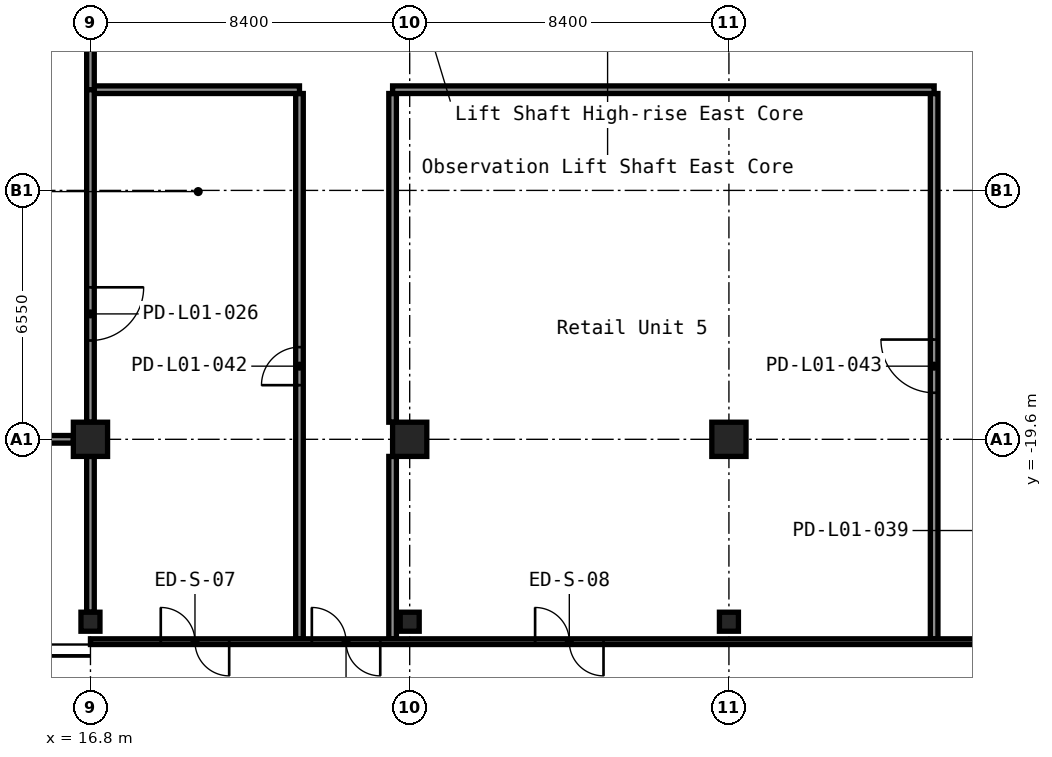
"""IFC4 building model, lengths in metres.
Left out: names, types, materials, properties, quantities, classifications, styles, units other than length and angle.
Written with IfcOpenShell. Run it as: python <this file> out.ifc"""

import sys

from ifc_helpers import new_model, si_unit, direction, frame, frame_2d, origin, origin_2d, place, context, subcontext, project, spatial, rectangle, hollow_rectangle, extrude, element, fill, save


model = new_model("IFC4")
c1 = context("Model", 3, precision=1e-05, world=origin(), true_north=direction((0.0, 1.0)))
c2 = subcontext(c1, "Body", "Model", "MODEL_VIEW")
j1 = project(units=[si_unit("LENGTHUNIT", "METRE"), si_unit("PLANEANGLEUNIT", "RADIAN")], contexts=[c1])
p1 = place(None, origin())
s1 = spatial("IfcSite", under=j1, at=p1, CompositionType="ELEMENT")
p2 = place(p1, origin())
s2 = spatial("IfcBuilding", under=s1, at=p2, CompositionType="ELEMENT")
p3 = place(p2, origin())
s3 = spatial("IfcBuildingStorey", under=s2, at=p3, CompositionType="ELEMENT", Elevation=0.0)
for number, where, z_axis, x_axis in (
    (1, (16.8, -19.6, -0.3), (0.0, 0.0, 1.0), (1.0, 0.0, 0.0)),
    (2, (25.2, -19.6, -0.3), (0.0, 0.0, 1.0), (1.0, 0.0, 0.0)),
    (3, (33.6, -19.6, -0.3), (0.0, 0.0, 1.0), (1.0, 0.0, 0.0)),
):
    element("IfcColumn", number, at=place(p3, frame(where, z_axis=z_axis, x_axis=x_axis)), inside=s3, PredefinedType="COLUMN", context=c2, shape_type="SweptSolid", body=[
        extrude(hollow_rectangle(XDim=0.9, YDim=0.9, WallThickness=0.036, at=origin_2d()), origin(), (0.0, 0.0, 1.0), 8.9),
    ])
for number, where, z_axis, x_axis in (
    (4, (16.8, -24.4, -0.3), (0.0, 0.0, 1.0), (1.0, 0.0, 0.0)),
    (5, (25.2, -24.4, -0.3), (0.0, 0.0, 1.0), (1.0, 0.0, 0.0)),
    (6, (33.6, -24.4, -0.3), (0.0, 0.0, 1.0), (1.0, 0.0, 0.0)),
):
    element("IfcColumn", number, at=place(p3, frame(where, z_axis=z_axis, x_axis=x_axis)), inside=s3, PredefinedType="COLUMN", context=c2, shape_type="SweptSolid", body=[
        extrude(hollow_rectangle(XDim=0.5, YDim=0.5, WallThickness=0.019, InnerFilletRadius=0.029, OuterFilletRadius=0.048, at=origin_2d()), origin(), (0.0, 0.0, 1.0), 8.9),
    ])
p4 = place(p3, frame((22.3, -24.85, 0.0), z_axis=(0.0, 0.0, 1.0), x_axis=(0.0, 1.0, 0.0)))
e7 = element("IfcWall", 7, at=p4, inside=s3, PredefinedType="PARTITIONING", context=c2, shape_type="SweptSolid", body=[
    extrude(rectangle(XDim=14.35, YDim=0.2, at=frame_2d((7.175, 0.0))), origin(), (0.0, 0.0, 1.0), 8.6),
])
p5 = place(p4, frame((6.675, 0.0, 0.0)))
e8 = element("IfcOpeningElement", 8, at=p5, cuts=e7, PredefinedType="OPENING", context=c2, shape_type="SweptSolid", body=[
    extrude(rectangle(XDim=1.0, YDim=2.1, at=frame_2d((0.5, 1.05))), frame((0.0, 0.11, 0.0), z_axis=(0.0, -1.0, 0.0), x_axis=(1.0, 0.0, 0.0)), (0.0, 0.0, 1.0), 0.22),
])
p6 = place(p3, frame((22.3, -10.4, 0.0), z_axis=(0.0, 0.0, 1.0), x_axis=(-1.0, 0.0, 0.0)))
e9 = element("IfcWall", 9, at=p6, inside=s3, PredefinedType="PARTITIONING", context=c2, shape_type="SweptSolid", body=[
    extrude(rectangle(XDim=5.4, YDim=0.2, at=frame_2d((2.7, 0.0))), origin(), (0.0, 0.0, 1.0), 8.6),
])
p7 = place(p3, frame((24.75, -10.5, 0.0), z_axis=(0.0, 0.0, 1.0), x_axis=(0.0, -1.0, 0.0)))
e10 = element("IfcWall", 10, at=p7, inside=s3, PredefinedType="PARTITIONING", context=c2, shape_type="SweptSolid", body=[
    extrude(rectangle(XDim=8.65, YDim=0.2, at=frame_2d((4.325, 0.0))), origin(), (0.0, 0.0, 1.0), 8.6),
])
p8 = place(p3, frame((24.75, -20.05, 0.0), z_axis=(0.0, 0.0, 1.0), x_axis=(0.0, -1.0, 0.0)))
e11 = element("IfcWall", 11, at=p8, inside=s3, PredefinedType="PARTITIONING", context=c2, shape_type="SweptSolid", body=[
    extrude(rectangle(XDim=4.8, YDim=0.2, at=frame_2d((2.4, 0.0))), origin(), (0.0, 0.0, 1.0), 8.6),
])
p9 = place(p3, frame((39.0, -24.85, 0.0), z_axis=(0.0, 0.0, 1.0), x_axis=(0.0, 1.0, 0.0)))
e12 = element("IfcWall", 12, at=p9, inside=s3, PredefinedType="PARTITIONING", context=c2, shape_type="SweptSolid", body=[
    extrude(rectangle(XDim=14.35, YDim=0.2, at=frame_2d((7.175, 0.0))), origin(), (0.0, 0.0, 1.0), 8.6),
])
p10 = place(p9, frame((6.475, 0.0, 0.0)))
e13 = element("IfcOpeningElement", 13, at=p10, cuts=e12, PredefinedType="OPENING", context=c2, shape_type="SweptSolid", body=[
    extrude(rectangle(XDim=1.4, YDim=2.1, at=frame_2d((0.7, 1.05))), frame((0.0, 0.11, 0.0), z_axis=(0.0, -1.0, 0.0), x_axis=(1.0, 0.0, 0.0)), (0.0, 0.0, 1.0), 0.22),
])
p11 = place(p3, frame((39.0, -10.4, 0.0), z_axis=(0.0, 0.0, 1.0), x_axis=(-1.0, 0.0, 0.0)))
e14 = element("IfcWall", 14, at=p11, inside=s3, PredefinedType="PARTITIONING", context=c2, shape_type="SweptSolid", body=[
    extrude(rectangle(XDim=14.25, YDim=0.2, at=frame_2d((7.125, 0.0))), origin(), (0.0, 0.0, 1.0), 8.6),
])
p12 = place(p3, frame((16.8, -10.4, 0.0), z_axis=(0.0, 0.0, 1.0), x_axis=(0.0, 1.0, 0.0)))
e15 = element("IfcWall", 15, at=p12, inside=s3, PredefinedType="PARTITIONING", context=c2, shape_type="SweptSolid", body=[
    extrude(rectangle(XDim=2.0, YDim=0.2, at=frame_2d((1.0, 0.0))), origin(), (0.0, 0.0, 1.0), 8.6),
])
p13 = place(p3, frame((16.8, -10.4, 0.0), z_axis=(0.0, 0.0, 1.0), x_axis=(0.0, -1.0, 0.0)))
e16 = element("IfcWall", 16, at=p13, inside=s3, PredefinedType="PARTITIONING", context=c2, shape_type="SweptSolid", body=[
    extrude(rectangle(XDim=8.75, YDim=0.2, at=frame_2d((4.375, 0.0))), origin(), (0.0, 0.0, 1.0), 8.6),
])
p14 = place(p13, frame((5.2, 0.0, 0.0)))
e17 = element("IfcOpeningElement", 17, at=p14, cuts=e16, PredefinedType="OPENING", context=c2, shape_type="SweptSolid", body=[
    extrude(rectangle(XDim=1.4, YDim=2.1, at=frame_2d((0.7, 1.05))), frame((0.0, 0.11, 0.0), z_axis=(0.0, -1.0, 0.0), x_axis=(1.0, 0.0, 0.0)), (0.0, 0.0, 1.0), 0.22),
])
p15 = place(p3, frame((16.35, -19.6, 0.0), z_axis=(0.0, 0.0, 1.0), x_axis=(-1.0, 0.0, 0.0)))
e18 = element("IfcWall", 18, at=p15, inside=s3, PredefinedType="PARTITIONING", context=c2, shape_type="SweptSolid", body=[
    extrude(rectangle(XDim=7.5, YDim=0.2, at=frame_2d((3.75, 0.0))), origin(), (0.0, 0.0, 1.0), 8.6),
])
p16 = place(p15, frame((2.55, 0.0, 0.0)))
e19 = element("IfcOpeningElement", 19, at=p16, cuts=e18, PredefinedType="OPENING", context=c2, shape_type="SweptSolid", body=[
    extrude(rectangle(XDim=2.4, YDim=2.1, at=frame_2d((1.2, 1.05))), frame((0.0, 0.11, 0.0), z_axis=(0.0, -1.0, 0.0), x_axis=(1.0, 0.0, 0.0)), (0.0, 0.0, 1.0), 0.22),
])
p17 = place(p3, frame((16.8, -20.05, 0.0), z_axis=(0.0, 0.0, 1.0), x_axis=(0.0, -1.0, 0.0)))
e20 = element("IfcWall", 20, at=p17, inside=s3, PredefinedType="PARTITIONING", context=c2, shape_type="SweptSolid", body=[
    extrude(rectangle(XDim=4.1, YDim=0.2, at=frame_2d((2.05, 0.0))), origin(), (0.0, 0.0, 1.0), 8.6),
])
p18 = place(p3, frame((51.98, -24.925, 0.0), z_axis=(0.0, 0.0, 1.0), x_axis=(-1.0, 0.0, 0.0)))
e21 = element("IfcWall", 21, at=p18, inside=s3, PredefinedType="STANDARD", context=c2, shape_type="SweptSolid", body=[
    extrude(rectangle(XDim=35.18, YDim=0.15, at=frame_2d((17.59, 0.0))), origin(), (0.0, 0.0, 1.0), 8.6),
])
p19 = place(p18, frame((8.28, 0.0, 0.0)))
e22 = element("IfcOpeningElement", 22, at=p19, cuts=e21, PredefinedType="OPENING", context=c2, shape_type="SweptSolid", body=[
    extrude(rectangle(XDim=1.4, YDim=2.1, at=frame_2d((0.7, 1.05))), frame((0.0, 0.085, 0.0), z_axis=(0.0, -1.0, 0.0), x_axis=(1.0, 0.0, 0.0)), (0.0, 0.0, 1.0), 0.17),
])
p20 = place(p18, frame((27.555, 0.0, 0.0)))
e23 = element("IfcOpeningElement", 23, at=p20, cuts=e21, PredefinedType="OPENING", context=c2, shape_type="SweptSolid", body=[
    extrude(rectangle(XDim=1.8, YDim=2.1, at=frame_2d((0.9, 1.05))), frame((0.0, 0.085, 0.0), z_axis=(0.0, -1.0, 0.0), x_axis=(1.0, 0.0, 0.0)), (0.0, 0.0, 1.0), 0.17),
])
p21 = place(p18, frame((31.53, 0.0, 0.0)))
e24 = element("IfcOpeningElement", 24, at=p21, cuts=e21, PredefinedType="OPENING", context=c2, shape_type="SweptSolid", body=[
    extrude(rectangle(XDim=1.8, YDim=2.1, at=frame_2d((0.9, 1.05))), frame((0.0, 0.085, 0.0), z_axis=(0.0, -1.0, 0.0), x_axis=(1.0, 0.0, 0.0)), (0.0, 0.0, 1.0), 0.17),
])
p22 = place(p18, frame((21.68, 0.0, 0.0)))
e25 = element("IfcOpeningElement", 25, at=p22, cuts=e21, PredefinedType="OPENING", context=c2, shape_type="SweptSolid", body=[
    extrude(rectangle(XDim=1.8, YDim=2.1, at=frame_2d((0.9, 1.05))), frame((0.0, 0.085, 0.0), z_axis=(0.0, -1.0, 0.0), x_axis=(1.0, 0.0, 0.0)), (0.0, 0.0, 1.0), 0.17),
])
p23 = place(p14, origin())
e26 = element("IfcDoor", 26, at=p23, inside=s3, OperationType="SINGLE_SWING_RIGHT", PredefinedType="DOOR", context=c2, shape_type="SweptSolid", body=[
    extrude(rectangle(XDim=1.4, YDim=2.1, at=frame_2d((0.7, 1.05))), frame((0.0, 0.025, 0.0), z_axis=(0.0, -1.0, 0.0), x_axis=(1.0, 0.0, 0.0)), (0.0, 0.0, 1.0), 0.05),
])
fill(e17, e26)
p24 = place(p5, origin())
e27 = element("IfcDoor", 27, at=p24, inside=s3, OperationType="SINGLE_SWING_RIGHT", PredefinedType="DOOR", context=c2, shape_type="SweptSolid", body=[
    extrude(rectangle(XDim=1.0, YDim=2.1, at=frame_2d((0.5, 1.05))), frame((0.0, 0.025, 0.0), z_axis=(0.0, -1.0, 0.0), x_axis=(1.0, 0.0, 0.0)), (0.0, 0.0, 1.0), 0.05),
])
fill(e8, e27)
p25 = place(p10, origin())
e28 = element("IfcDoor", 28, at=p25, inside=s3, OperationType="SINGLE_SWING_LEFT", PredefinedType="DOOR", context=c2, shape_type="SweptSolid", body=[
    extrude(rectangle(XDim=1.4, YDim=2.1, at=frame_2d((0.7, 1.05))), frame((0.0, 0.025, 0.0), z_axis=(0.0, -1.0, 0.0), x_axis=(1.0, 0.0, 0.0)), (0.0, 0.0, 1.0), 0.05),
])
fill(e13, e28)
p26 = place(p20, origin())
e29 = element("IfcDoor", 29, at=p26, inside=s3, OperationType="DOUBLE_DOOR_SINGLE_SWING", PredefinedType="DOOR", context=c2, shape_type="SweptSolid", body=[
    extrude(rectangle(XDim=1.8, YDim=2.1, at=frame_2d((0.9, 1.05))), frame((0.0, 0.025, 0.0), z_axis=(0.0, -1.0, 0.0), x_axis=(1.0, 0.0, 0.0)), (0.0, 0.0, 1.0), 0.05),
])
fill(e23, e29)
p27 = place(p21, origin())
e30 = element("IfcDoor", 30, at=p27, inside=s3, OperationType="DOUBLE_DOOR_DOUBLE_SWING", PredefinedType="DOOR", context=c2, shape_type="SweptSolid", body=[
    extrude(rectangle(XDim=1.8, YDim=2.1, at=frame_2d((0.9, 1.05))), frame((0.0, 0.025, 0.0), z_axis=(0.0, -1.0, 0.0), x_axis=(1.0, 0.0, 0.0)), (0.0, 0.0, 1.0), 0.05),
])
fill(e24, e30)
p28 = place(p22, origin())
e31 = element("IfcDoor", 31, at=p28, inside=s3, OperationType="DOUBLE_DOOR_DOUBLE_SWING", PredefinedType="DOOR", context=c2, shape_type="SweptSolid", body=[
    extrude(rectangle(XDim=1.8, YDim=2.1, at=frame_2d((0.9, 1.05))), frame((0.0, 0.025, 0.0), z_axis=(0.0, -1.0, 0.0), x_axis=(1.0, 0.0, 0.0)), (0.0, 0.0, 1.0), 0.05),
])
fill(e25, e31)
save(model, sys.argv[1])
